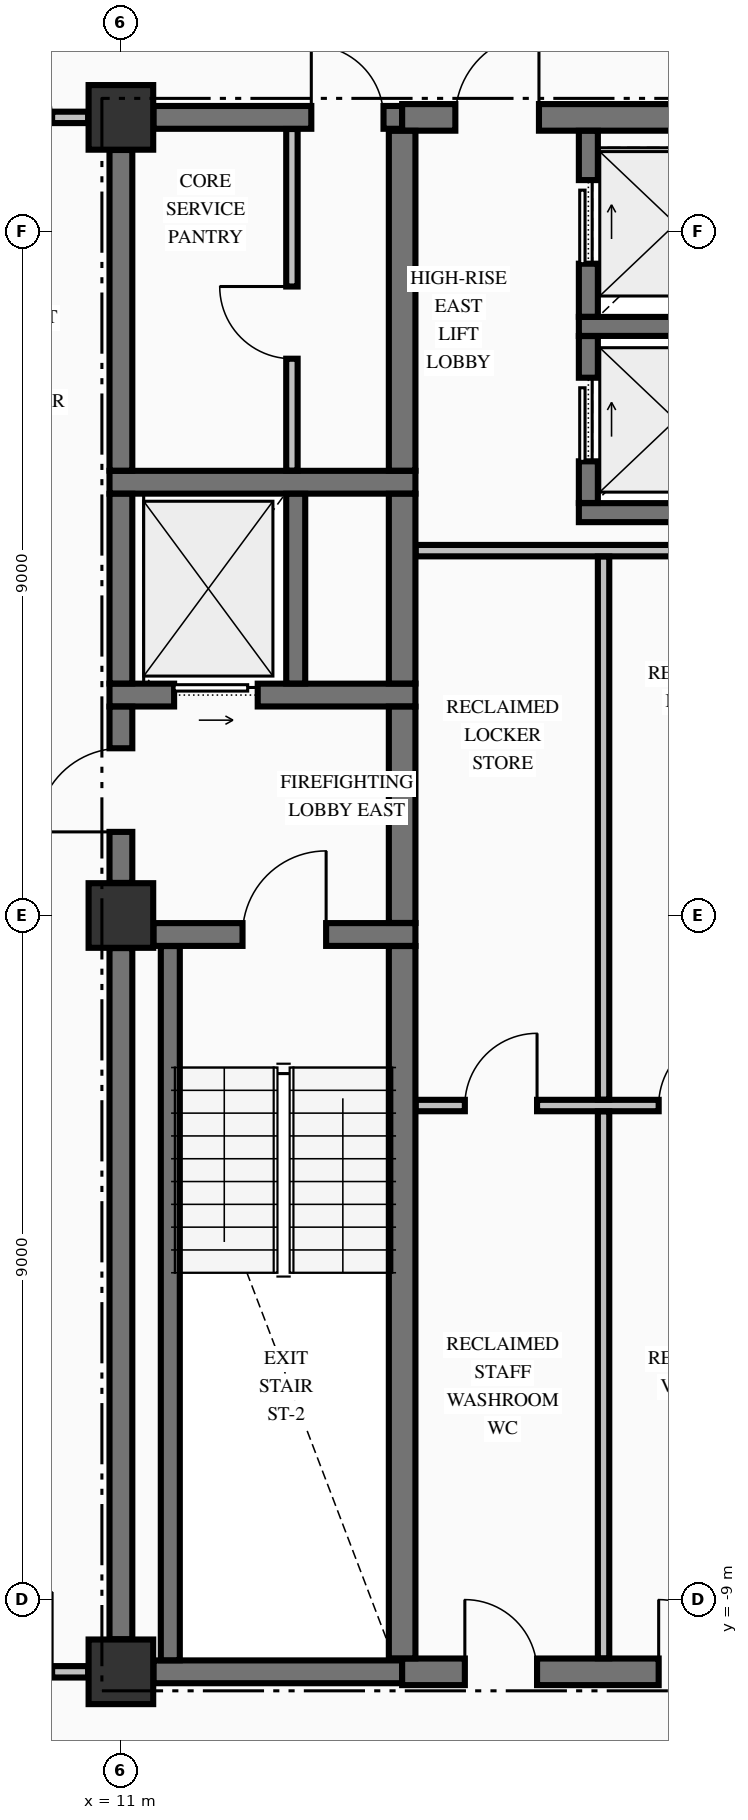
"""IFC4 building model, lengths in metres.
Left out: names, types, materials, properties, quantities, classifications, styles, units other than length and angle.
Written with IfcOpenShell. Run it as: python <this file> out.ifc"""

import sys

from ifc_helpers import new_model, si_unit, direction, frame, frame_2d, origin, origin_2d, place, context, subcontext, project, spatial, rectangle, extrude, element, fill, save


model = new_model("IFC4")
c1 = context("Model", 3, precision=1e-05, world=origin(), true_north=direction((0.0, 1.0)))
c2 = subcontext(c1, "Body", "Model", "MODEL_VIEW")
j1 = project(units=[si_unit("LENGTHUNIT", "METRE"), si_unit("PLANEANGLEUNIT", "RADIAN")], contexts=[c1])
p1 = place(None, origin())
s1 = spatial("IfcSite", under=j1, at=p1, CompositionType="ELEMENT")
p2 = place(p1, origin())
s2 = spatial("IfcBuilding", under=s1, at=p2, CompositionType="ELEMENT")
p3 = place(p2, frame((0.0, 0.0, 172.86)))
s3 = spatial("IfcBuildingStorey", under=s2, at=p3, CompositionType="ELEMENT", Elevation=172.86)
for number, where, z_axis, x_axis in (
    (1, (11.0, -9.95, -0.25), (0.0, 0.0, 1.0), (1.0, 0.0, 0.0)),
    (2, (11.0, 0.0, -0.25), (0.0, 0.0, 1.0), (1.0, 0.0, 0.0)),
    (3, (11.0, 10.5, -0.25), (0.0, 0.0, 1.0), (1.0, 0.0, 0.0)),
):
    element("IfcColumn", number, at=place(p3, frame(where, z_axis=z_axis, x_axis=x_axis)), inside=s3, PredefinedType="COLUMN", context=c2, shape_type="SweptSolid", body=[
        extrude(rectangle(XDim=0.85, YDim=0.85, at=origin_2d()), origin(), (0.0, 0.0, 1.0), 3.375),
    ])
p4 = place(p3, frame((11.429, -9.95, 0.0), z_axis=(0.0, 0.0, 1.0), x_axis=(1.0, 0.0, 0.0)))
e4 = element("IfcWall", 4, at=p4, inside=s3, PredefinedType="SHEAR", context=c2, shape_type="SweptSolid", body=[
    extrude(rectangle(XDim=3.271, YDim=0.3, at=frame_2d((1.635, 0.0))), origin(), (0.0, 0.0, 1.0), 3.125),
])
p5 = place(p3, frame((14.7, -9.95, 0.0), z_axis=(0.0, 0.0, 1.0), x_axis=(1.0, 0.0, 0.0)))
e5 = element("IfcWall", 5, at=p5, inside=s3, PredefinedType="SHEAR", context=c2, shape_type="SweptSolid", body=[
    extrude(rectangle(XDim=4.871, YDim=0.35, at=frame_2d((2.436, 0.0))), origin(), (0.0, 0.0, 1.0), 3.125),
])
p6 = place(p5, frame((0.825, 0.0, 0.0)))
e6 = element("IfcOpeningElement", 6, at=p6, cuts=e5, PredefinedType="OPENING", context=c2, shape_type="SweptSolid", body=[
    extrude(rectangle(XDim=0.95, YDim=2.15, at=frame_2d((0.475, 1.075))), frame((0.0, 0.185, 0.0), z_axis=(0.0, -1.0, 0.0), x_axis=(1.0, 0.0, 0.0)), (0.0, 0.0, 1.0), 0.37),
])
p7 = place(p5, frame((3.375, 0.0, 0.0)))
e7 = element("IfcOpeningElement", 7, at=p7, cuts=e5, PredefinedType="OPENING", context=c2, shape_type="SweptSolid", body=[
    extrude(rectangle(XDim=0.95, YDim=2.15, at=frame_2d((0.475, 1.075))), frame((0.0, 0.185, 0.0), z_axis=(0.0, -1.0, 0.0), x_axis=(1.0, 0.0, 0.0)), (0.0, 0.0, 1.0), 0.37),
])
p8 = place(p3, frame((11.429, -0.25, 0.0), z_axis=(0.0, 0.0, 1.0), x_axis=(1.0, 0.0, 0.0)))
e8 = element("IfcWall", 8, at=p8, inside=s3, PredefinedType="SHEAR", context=c2, shape_type="SweptSolid", body=[
    extrude(rectangle(XDim=3.446, YDim=0.3, at=frame_2d((1.723, 0.0))), origin(), (0.0, 0.0, 1.0), 3.125),
])
p9 = place(p8, frame((1.171, 0.0, 0.0)))
e9 = element("IfcOpeningElement", 9, at=p9, cuts=e8, PredefinedType="OPENING", context=c2, shape_type="SweptSolid", body=[
    extrude(rectangle(XDim=1.1, YDim=2.15, at=frame_2d((0.55, 1.075))), frame((0.0, 0.16, 0.0), z_axis=(0.0, -1.0, 0.0), x_axis=(1.0, 0.0, 0.0)), (0.0, 0.0, 1.0), 0.32),
])
p10 = place(p3, frame((10.85, 2.9, 0.0), z_axis=(0.0, 0.0, 1.0), x_axis=(1.0, 0.0, 0.0)))
e10 = element("IfcWall", 10, at=p10, inside=s3, PredefinedType="SHEAR", context=c2, shape_type="SweptSolid", body=[
    extrude(rectangle(XDim=4.025, YDim=0.3, at=frame_2d((2.012, 0.0))), origin(), (0.0, 0.0, 1.0), 3.125),
])
p11 = place(p10, frame((0.85, 0.0, 0.0)))
e11 = element("IfcOpeningElement", 11, at=p11, cuts=e10, PredefinedType="OPENING", context=c2, shape_type="SweptSolid", body=[
    extrude(rectangle(XDim=1.1, YDim=2.2, at=frame_2d((0.55, 1.1))), frame((0.0, 0.16, 0.0), z_axis=(0.0, -1.0, 0.0), x_axis=(1.0, 0.0, 0.0)), (0.0, 0.0, 1.0), 0.32),
])
p12 = place(p3, frame((17.025, 5.3, 0.0), z_axis=(0.0, 0.0, 1.0), x_axis=(1.0, 0.0, 0.0)))
e12 = element("IfcWall", 12, at=p12, inside=s3, PredefinedType="SOLIDWALL", context=c2, shape_type="SweptSolid", body=[
    extrude(rectangle(XDim=3.15, YDim=0.25, at=frame_2d((1.575, 0.0))), origin(), (0.0, 0.0, 1.0), 3.125),
])
p13 = place(p3, frame((10.85, 5.7, 0.0), z_axis=(0.0, 0.0, 1.0), x_axis=(1.0, 0.0, 0.0)))
e13 = element("IfcWall", 13, at=p13, inside=s3, PredefinedType="SHEAR", context=c2, shape_type="SweptSolid", body=[
    extrude(rectangle(XDim=4.025, YDim=0.3, at=frame_2d((2.012, 0.0))), origin(), (0.0, 0.0, 1.0), 3.125),
])
p14 = place(p3, frame((17.025, 7.75, 0.0), z_axis=(0.0, 0.0, 1.0), x_axis=(1.0, 0.0, 0.0)))
e14 = element("IfcWall", 14, at=p14, inside=s3, PredefinedType="SOLIDWALL", context=c2, shape_type="SweptSolid", body=[
    extrude(rectangle(XDim=3.15, YDim=0.25, at=frame_2d((1.575, 0.0))), origin(), (0.0, 0.0, 1.0), 3.125),
])
p15 = place(p3, frame((11.429, 10.5, 0.0), z_axis=(0.0, 0.0, 1.0), x_axis=(1.0, 0.0, 0.0)))
e15 = element("IfcWall", 15, at=p15, inside=s3, PredefinedType="SHEAR", context=c2, shape_type="SweptSolid", body=[
    extrude(rectangle(XDim=3.271, YDim=0.3, at=frame_2d((1.635, 0.0))), origin(), (0.0, 0.0, 1.0), 3.125),
])
p16 = place(p15, frame((2.076, 0.0, 0.0)))
e16 = element("IfcOpeningElement", 16, at=p16, cuts=e15, PredefinedType="OPENING", context=c2, shape_type="SweptSolid", body=[
    extrude(rectangle(XDim=0.95, YDim=2.15, at=frame_2d((0.475, 1.075))), frame((0.0, 0.16, 0.0), z_axis=(0.0, -1.0, 0.0), x_axis=(1.0, 0.0, 0.0)), (0.0, 0.0, 1.0), 0.32),
])
p17 = place(p3, frame((14.7, 10.5, 0.0), z_axis=(0.0, 0.0, 1.0), x_axis=(1.0, 0.0, 0.0)))
e17 = element("IfcWall", 17, at=p17, inside=s3, PredefinedType="SHEAR", context=c2, shape_type="SweptSolid", body=[
    extrude(rectangle(XDim=4.871, YDim=0.35, at=frame_2d((2.436, 0.0))), origin(), (0.0, 0.0, 1.0), 3.125),
])
p18 = place(p17, frame((0.7, 0.0, 0.0)))
e18 = element("IfcOpeningElement", 18, at=p18, cuts=e17, PredefinedType="OPENING", context=c2, shape_type="SweptSolid", body=[
    extrude(rectangle(XDim=1.1, YDim=2.15, at=frame_2d((0.55, 1.075))), frame((0.0, 0.185, 0.0), z_axis=(0.0, -1.0, 0.0), x_axis=(1.0, 0.0, 0.0)), (0.0, 0.0, 1.0), 0.37),
])
p19 = place(p3, frame((-10.569, -9.95, 0.0), z_axis=(0.0, 0.0, 1.0), x_axis=(1.0, 0.0, 0.0)))
e19 = element("IfcWall", 19, at=p19, inside=s3, PredefinedType="PARTITIONING", context=c2, shape_type="SweptSolid", body=[
    extrude(rectangle(XDim=21.138, YDim=0.15, at=frame_2d((10.569, 0.0))), origin(), (0.0, 0.0, 1.0), 3.125),
])
p20 = place(p19, frame((0.474, 0.0, 0.0)))
e20 = element("IfcOpeningElement", 20, at=p20, cuts=e19, PredefinedType="OPENING", context=c2, shape_type="SweptSolid", body=[
    extrude(rectangle(XDim=1.05, YDim=2.15, at=frame_2d((0.525, 1.075))), frame((0.0, 0.085, 0.0), z_axis=(0.0, -1.0, 0.0), x_axis=(1.0, 0.0, 0.0)), (0.0, 0.0, 1.0), 0.17),
])
p21 = place(p19, frame((19.614, 0.0, 0.0)))
e21 = element("IfcOpeningElement", 21, at=p21, cuts=e19, PredefinedType="OPENING", context=c2, shape_type="SweptSolid", body=[
    extrude(rectangle(XDim=1.05, YDim=2.15, at=frame_2d((0.525, 1.075))), frame((0.0, 0.085, 0.0), z_axis=(0.0, -1.0, 0.0), x_axis=(1.0, 0.0, 0.0)), (0.0, 0.0, 1.0), 0.17),
])
p22 = place(p19, frame((11.774, 0.0, 0.0)))
e22 = element("IfcOpeningElement", 22, at=p22, cuts=e19, PredefinedType="OPENING", context=c2, shape_type="SweptSolid", body=[
    extrude(rectangle(XDim=0.95, YDim=2.15, at=frame_2d((0.475, 1.075))), frame((0.0, 0.085, 0.0), z_axis=(0.0, -1.0, 0.0), x_axis=(1.0, 0.0, 0.0)), (0.0, 0.0, 1.0), 0.17),
])
p23 = place(p3, frame((14.878, -2.5, 0.0), z_axis=(0.0, 0.0, 1.0), x_axis=(1.0, 0.0, 0.0)))
e23 = element("IfcWall", 23, at=p23, inside=s3, PredefinedType="PARTITIONING", context=c2, shape_type="SweptSolid", body=[
    extrude(rectangle(XDim=4.944, YDim=0.15, at=frame_2d((2.472, 0.0))), origin(), (0.0, 0.0, 1.0), 3.125),
])
p24 = place(p23, frame((0.647, 0.0, 0.0)))
e24 = element("IfcOpeningElement", 24, at=p24, cuts=e23, PredefinedType="OPENING", context=c2, shape_type="SweptSolid", body=[
    extrude(rectangle(XDim=0.95, YDim=2.15, at=frame_2d((0.475, 1.075))), frame((0.0, 0.085, 0.0), z_axis=(0.0, -1.0, 0.0), x_axis=(1.0, 0.0, 0.0)), (0.0, 0.0, 1.0), 0.17),
])
p25 = place(p23, frame((3.197, 0.0, 0.0)))
e25 = element("IfcOpeningElement", 25, at=p25, cuts=e23, PredefinedType="OPENING", context=c2, shape_type="SweptSolid", body=[
    extrude(rectangle(XDim=0.95, YDim=2.15, at=frame_2d((0.475, 1.075))), frame((0.0, 0.085, 0.0), z_axis=(0.0, -1.0, 0.0), x_axis=(1.0, 0.0, 0.0)), (0.0, 0.0, 1.0), 0.17),
])
p26 = place(p3, frame((14.878, 4.8, 0.0), z_axis=(0.0, 0.0, 1.0), x_axis=(1.0, 0.0, 0.0)))
e26 = element("IfcWall", 26, at=p26, inside=s3, PredefinedType="PARTITIONING", context=c2, shape_type="SweptSolid", body=[
    extrude(rectangle(XDim=4.944, YDim=0.15, at=frame_2d((2.472, 0.0))), origin(), (0.0, 0.0, 1.0), 3.125),
])
p27 = place(p3, frame((-10.569, 10.5, 0.0), z_axis=(0.0, 0.0, 1.0), x_axis=(1.0, 0.0, 0.0)))
e27 = element("IfcWall", 27, at=p27, inside=s3, PredefinedType="PARTITIONING", context=c2, shape_type="SweptSolid", body=[
    extrude(rectangle(XDim=21.138, YDim=0.15, at=frame_2d((10.569, 0.0))), origin(), (0.0, 0.0, 1.0), 3.125),
])
p28 = place(p27, frame((0.474, 0.0, 0.0)))
e28 = element("IfcOpeningElement", 28, at=p28, cuts=e27, PredefinedType="OPENING", context=c2, shape_type="SweptSolid", body=[
    extrude(rectangle(XDim=1.05, YDim=2.15, at=frame_2d((0.525, 1.075))), frame((0.0, 0.085, 0.0), z_axis=(0.0, -1.0, 0.0), x_axis=(1.0, 0.0, 0.0)), (0.0, 0.0, 1.0), 0.17),
])
p29 = place(p27, frame((19.614, 0.0, 0.0)))
e29 = element("IfcOpeningElement", 29, at=p29, cuts=e27, PredefinedType="OPENING", context=c2, shape_type="SweptSolid", body=[
    extrude(rectangle(XDim=1.05, YDim=2.15, at=frame_2d((0.525, 1.075))), frame((0.0, 0.085, 0.0), z_axis=(0.0, -1.0, 0.0), x_axis=(1.0, 0.0, 0.0)), (0.0, 0.0, 1.0), 0.17),
])
p30 = place(p3, frame((11.0, -9.521, 0.0), z_axis=(0.0, 0.0, 1.0), x_axis=(0.0, 1.0, 0.0)))
e30 = element("IfcWall", 30, at=p30, inside=s3, PredefinedType="SHEAR", context=c2, shape_type="SweptSolid", body=[
    extrude(rectangle(XDim=9.092, YDim=0.3, at=frame_2d((4.546, 0.0))), origin(), (0.0, 0.0, 1.0), 3.125),
])
p31 = place(p3, frame((11.0, 0.429, 0.0), z_axis=(0.0, 0.0, 1.0), x_axis=(0.0, 1.0, 0.0)))
e31 = element("IfcWall", 31, at=p31, inside=s3, PredefinedType="SHEAR", context=c2, shape_type="SweptSolid", body=[
    extrude(rectangle(XDim=2.319, YDim=0.3, at=frame_2d((1.16, 0.0))), origin(), (0.0, 0.0, 1.0), 3.125),
])
p32 = place(p31, frame((0.671, 0.0, 0.0)))
e32 = element("IfcOpeningElement", 32, at=p32, cuts=e31, PredefinedType="OPENING", context=c2, shape_type="SweptSolid", body=[
    extrude(rectangle(XDim=1.1, YDim=2.15, at=frame_2d((0.55, 1.075))), frame((0.0, 0.16, 0.0), z_axis=(0.0, -1.0, 0.0), x_axis=(1.0, 0.0, 0.0)), (0.0, 0.0, 1.0), 0.32),
])
p33 = place(p3, frame((11.0, 3.052, 0.0), z_axis=(0.0, 0.0, 1.0), x_axis=(0.0, 1.0, 0.0)))
e33 = element("IfcWall", 33, at=p33, inside=s3, PredefinedType="SHEAR", context=c2, shape_type="SweptSolid", body=[
    extrude(rectangle(XDim=2.496, YDim=0.3, at=frame_2d((1.248, 0.0))), origin(), (0.0, 0.0, 1.0), 3.125),
])
p34 = place(p3, frame((11.0, 5.852, 0.0), z_axis=(0.0, 0.0, 1.0), x_axis=(0.0, 1.0, 0.0)))
e34 = element("IfcWall", 34, at=p34, inside=s3, PredefinedType="SHEAR", context=c2, shape_type="SweptSolid", body=[
    extrude(rectangle(XDim=4.219, YDim=0.3, at=frame_2d((2.109, 0.0))), origin(), (0.0, 0.0, 1.0), 3.125),
])
p35 = place(p3, frame((11.65, -9.798, 0.0), z_axis=(0.0, 0.0, 1.0), x_axis=(0.0, 1.0, 0.0)))
e35 = element("IfcWall", 35, at=p35, inside=s3, PredefinedType="SOLIDWALL", context=c2, shape_type="SweptSolid", body=[
    extrude(rectangle(XDim=9.396, YDim=0.25, at=frame_2d((4.698, 0.0))), origin(), (0.0, 0.0, 1.0), 3.125),
])
p36 = place(p3, frame((13.3, 3.052, 0.0), z_axis=(0.0, 0.0, 1.0), x_axis=(0.0, 1.0, 0.0)))
e36 = element("IfcWall", 36, at=p36, inside=s3, PredefinedType="SOLIDWALL", context=c2, shape_type="SweptSolid", body=[
    extrude(rectangle(XDim=2.496, YDim=0.25, at=frame_2d((1.248, 0.0))), origin(), (0.0, 0.0, 1.0), 3.125),
])
p37 = place(p3, frame((14.7, -9.773, 0.0), z_axis=(0.0, 0.0, 1.0), x_axis=(0.0, 1.0, 0.0)))
e37 = element("IfcWall", 37, at=p37, inside=s3, PredefinedType="SHEAR", context=c2, shape_type="SweptSolid", body=[
    extrude(rectangle(XDim=9.371, YDim=0.35, at=frame_2d((4.686, 0.0))), origin(), (0.0, 0.0, 1.0), 3.125),
])
p38 = place(p3, frame((14.7, -0.098, 0.0), z_axis=(0.0, 0.0, 1.0), x_axis=(0.0, 1.0, 0.0)))
e38 = element("IfcWall", 38, at=p38, inside=s3, PredefinedType="SHEAR", context=c2, shape_type="SweptSolid", body=[
    extrude(rectangle(XDim=2.846, YDim=0.35, at=frame_2d((1.423, 0.0))), origin(), (0.0, 0.0, 1.0), 3.125),
])
p39 = place(p3, frame((14.7, 3.052, 0.0), z_axis=(0.0, 0.0, 1.0), x_axis=(0.0, 1.0, 0.0)))
e39 = element("IfcWall", 39, at=p39, inside=s3, PredefinedType="SHEAR", context=c2, shape_type="SweptSolid", body=[
    extrude(rectangle(XDim=2.496, YDim=0.35, at=frame_2d((1.248, 0.0))), origin(), (0.0, 0.0, 1.0), 3.125),
])
p40 = place(p3, frame((14.7, 5.852, 0.0), z_axis=(0.0, 0.0, 1.0), x_axis=(0.0, 1.0, 0.0)))
e40 = element("IfcWall", 40, at=p40, inside=s3, PredefinedType="SHEAR", context=c2, shape_type="SweptSolid", body=[
    extrude(rectangle(XDim=4.471, YDim=0.35, at=frame_2d((2.235, 0.0))), origin(), (0.0, 0.0, 1.0), 3.125),
])
p41 = place(p3, frame((17.15, 5.427, 0.0), z_axis=(0.0, 0.0, 1.0), x_axis=(0.0, 1.0, 0.0)))
e41 = element("IfcWall", 41, at=p41, inside=s3, PredefinedType="SOLIDWALL", context=c2, shape_type="SweptSolid", body=[
    extrude(rectangle(XDim=2.196, YDim=0.25, at=frame_2d((1.098, 0.0))), origin(), (0.0, 0.0, 1.0), 3.125),
])
p42 = place(p41, frame((0.548, 0.0, 0.0)))
e42 = element("IfcOpeningElement", 42, at=p42, cuts=e41, PredefinedType="OPENING", context=c2, shape_type="SweptSolid", body=[
    extrude(rectangle(XDim=1.1, YDim=2.2, at=frame_2d((0.55, 1.1))), frame((0.0, 0.135, 0.0), z_axis=(0.0, -1.0, 0.0), x_axis=(1.0, 0.0, 0.0)), (0.0, 0.0, 1.0), 0.27),
])
p43 = place(p3, frame((17.15, 7.877, 0.0), z_axis=(0.0, 0.0, 1.0), x_axis=(0.0, 1.0, 0.0)))
e43 = element("IfcWall", 43, at=p43, inside=s3, PredefinedType="SOLIDWALL", context=c2, shape_type="SweptSolid", body=[
    extrude(rectangle(XDim=2.446, YDim=0.25, at=frame_2d((1.223, 0.0))), origin(), (0.0, 0.0, 1.0), 3.125),
])
p44 = place(p43, frame((0.698, 0.0, 0.0)))
e44 = element("IfcOpeningElement", 44, at=p44, cuts=e43, PredefinedType="OPENING", context=c2, shape_type="SweptSolid", body=[
    extrude(rectangle(XDim=1.1, YDim=2.2, at=frame_2d((0.55, 1.1))), frame((0.0, 0.135, 0.0), z_axis=(0.0, -1.0, 0.0), x_axis=(1.0, 0.0, 0.0)), (0.0, 0.0, 1.0), 0.27),
])
p45 = place(p3, frame((13.25, 5.853, 0.0), z_axis=(0.0, 0.0, 1.0), x_axis=(0.0, 1.0, 0.0)))
e45 = element("IfcWall", 45, at=p45, inside=s3, PredefinedType="PARTITIONING", context=c2, shape_type="SweptSolid", body=[
    extrude(rectangle(XDim=4.494, YDim=0.15, at=frame_2d((2.247, 0.0))), origin(), (0.0, 0.0, 1.0), 3.125),
])
p46 = place(p45, frame((1.472, 0.0, 0.0)))
e46 = element("IfcOpeningElement", 46, at=p46, cuts=e45, PredefinedType="OPENING", context=c2, shape_type="SweptSolid", body=[
    extrude(rectangle(XDim=0.95, YDim=2.15, at=frame_2d((0.475, 1.075))), frame((0.0, 0.085, 0.0), z_axis=(0.0, -1.0, 0.0), x_axis=(1.0, 0.0, 0.0)), (0.0, 0.0, 1.0), 0.17),
])
p47 = place(p3, frame((17.35, -9.772, 0.0), z_axis=(0.0, 0.0, 1.0), x_axis=(0.0, 1.0, 0.0)))
e47 = element("IfcWall", 47, at=p47, inside=s3, PredefinedType="PARTITIONING", context=c2, shape_type="SweptSolid", body=[
    extrude(rectangle(XDim=7.194, YDim=0.15, at=frame_2d((3.597, 0.0))), origin(), (0.0, 0.0, 1.0), 3.125),
])
p48 = place(p3, frame((17.35, -2.422, 0.0), z_axis=(0.0, 0.0, 1.0), x_axis=(0.0, 1.0, 0.0)))
e48 = element("IfcWall", 48, at=p48, inside=s3, PredefinedType="PARTITIONING", context=c2, shape_type="SweptSolid", body=[
    extrude(rectangle(XDim=7.144, YDim=0.15, at=frame_2d((3.572, 0.0))), origin(), (0.0, 0.0, 1.0), 3.125),
])
p49 = place(p9, origin())
e49 = element("IfcDoor", 49, at=p49, inside=s3, OperationType="SINGLE_SWING_RIGHT", PredefinedType="DOOR", context=c2, shape_type="SweptSolid", body=[
    extrude(rectangle(XDim=1.1, YDim=2.15, at=frame_2d((0.55, 1.075))), frame((0.0, 0.025, 0.0), z_axis=(0.0, -1.0, 0.0), x_axis=(1.0, 0.0, 0.0)), (0.0, 0.0, 1.0), 0.05),
])
fill(e9, e49)
p50 = place(p32, origin())
e50 = element("IfcDoor", 50, at=p50, inside=s3, OperationType="SINGLE_SWING_LEFT", PredefinedType="DOOR", context=c2, shape_type="SweptSolid", body=[
    extrude(rectangle(XDim=1.1, YDim=2.15, at=frame_2d((0.55, 1.075))), frame((0.0, 0.025, 0.0), z_axis=(0.0, -1.0, 0.0), x_axis=(1.0, 0.0, 0.0)), (0.0, 0.0, 1.0), 0.05),
])
fill(e32, e50)
p51 = place(p11, origin())
e51 = element("IfcDoor", 51, at=p51, inside=s3, OperationType="SLIDING_TO_RIGHT", PredefinedType="DOOR", context=c2, shape_type="SweptSolid", body=[
    extrude(rectangle(XDim=1.1, YDim=2.2, at=frame_2d((0.55, 1.1))), frame((0.0, 0.025, 0.0), z_axis=(0.0, -1.0, 0.0), x_axis=(1.0, 0.0, 0.0)), (0.0, 0.0, 1.0), 0.05),
])
fill(e11, e51)
p52 = place(p16, origin())
e52 = element("IfcDoor", 52, at=p52, inside=s3, OperationType="SINGLE_SWING_LEFT", PredefinedType="DOOR", context=c2, shape_type="SweptSolid", body=[
    extrude(rectangle(XDim=0.95, YDim=2.15, at=frame_2d((0.475, 1.075))), frame((0.0, 0.025, 0.0), z_axis=(0.0, -1.0, 0.0), x_axis=(1.0, 0.0, 0.0)), (0.0, 0.0, 1.0), 0.05),
])
fill(e16, e52)
p53 = place(p46, origin())
e53 = element("IfcDoor", 53, at=p53, inside=s3, OperationType="SINGLE_SWING_RIGHT", PredefinedType="DOOR", context=c2, shape_type="SweptSolid", body=[
    extrude(rectangle(XDim=0.95, YDim=2.15, at=frame_2d((0.475, 1.075))), frame((0.0, 0.025, 0.0), z_axis=(0.0, -1.0, 0.0), x_axis=(1.0, 0.0, 0.0)), (0.0, 0.0, 1.0), 0.05),
])
fill(e46, e53)
p54 = place(p42, origin())
e54 = element("IfcDoor", 54, at=p54, inside=s3, OperationType="SLIDING_TO_RIGHT", PredefinedType="DOOR", context=c2, shape_type="SweptSolid", body=[
    extrude(rectangle(XDim=1.1, YDim=2.2, at=frame_2d((0.55, 1.1))), frame((0.0, 0.025, 0.0), z_axis=(0.0, -1.0, 0.0), x_axis=(1.0, 0.0, 0.0)), (0.0, 0.0, 1.0), 0.05),
])
fill(e42, e54)
p55 = place(p44, origin())
e55 = element("IfcDoor", 55, at=p55, inside=s3, OperationType="SLIDING_TO_RIGHT", PredefinedType="DOOR", context=c2, shape_type="SweptSolid", body=[
    extrude(rectangle(XDim=1.1, YDim=2.2, at=frame_2d((0.55, 1.1))), frame((0.0, 0.025, 0.0), z_axis=(0.0, -1.0, 0.0), x_axis=(1.0, 0.0, 0.0)), (0.0, 0.0, 1.0), 0.05),
])
fill(e44, e55)
p56 = place(p18, origin())
e56 = element("IfcDoor", 56, at=p56, inside=s3, OperationType="SINGLE_SWING_RIGHT", PredefinedType="DOOR", context=c2, shape_type="SweptSolid", body=[
    extrude(rectangle(XDim=1.1, YDim=2.15, at=frame_2d((0.55, 1.075))), frame((0.0, 0.025, 0.0), z_axis=(0.0, -1.0, 0.0), x_axis=(1.0, 0.0, 0.0)), (0.0, 0.0, 1.0), 0.05),
])
fill(e18, e56)
p57 = place(p6, origin())
e57 = element("IfcDoor", 57, at=p57, inside=s3, OperationType="SINGLE_SWING_LEFT", PredefinedType="DOOR", context=c2, shape_type="SweptSolid", body=[
    extrude(rectangle(XDim=0.95, YDim=2.15, at=frame_2d((0.475, 1.075))), frame((0.0, 0.025, 0.0), z_axis=(0.0, -1.0, 0.0), x_axis=(1.0, 0.0, 0.0)), (0.0, 0.0, 1.0), 0.05),
])
fill(e6, e57)
p58 = place(p24, origin())
e58 = element("IfcDoor", 58, at=p58, inside=s3, OperationType="SINGLE_SWING_RIGHT", PredefinedType="DOOR", context=c2, shape_type="SweptSolid", body=[
    extrude(rectangle(XDim=0.95, YDim=2.15, at=frame_2d((0.475, 1.075))), frame((0.0, 0.025, 0.0), z_axis=(0.0, -1.0, 0.0), x_axis=(1.0, 0.0, 0.0)), (0.0, 0.0, 1.0), 0.05),
])
fill(e24, e58)
p59 = place(p7, origin())
e59 = element("IfcDoor", 59, at=p59, inside=s3, OperationType="SINGLE_SWING_LEFT", PredefinedType="DOOR", context=c2, shape_type="SweptSolid", body=[
    extrude(rectangle(XDim=0.95, YDim=2.15, at=frame_2d((0.475, 1.075))), frame((0.0, 0.025, 0.0), z_axis=(0.0, -1.0, 0.0), x_axis=(1.0, 0.0, 0.0)), (0.0, 0.0, 1.0), 0.05),
])
fill(e7, e59)
p60 = place(p25, origin())
e60 = element("IfcDoor", 60, at=p60, inside=s3, OperationType="SINGLE_SWING_RIGHT", PredefinedType="DOOR", context=c2, shape_type="SweptSolid", body=[
    extrude(rectangle(XDim=0.95, YDim=2.15, at=frame_2d((0.475, 1.075))), frame((0.0, 0.025, 0.0), z_axis=(0.0, -1.0, 0.0), x_axis=(1.0, 0.0, 0.0)), (0.0, 0.0, 1.0), 0.05),
])
fill(e25, e60)
save(model, sys.argv[1])
